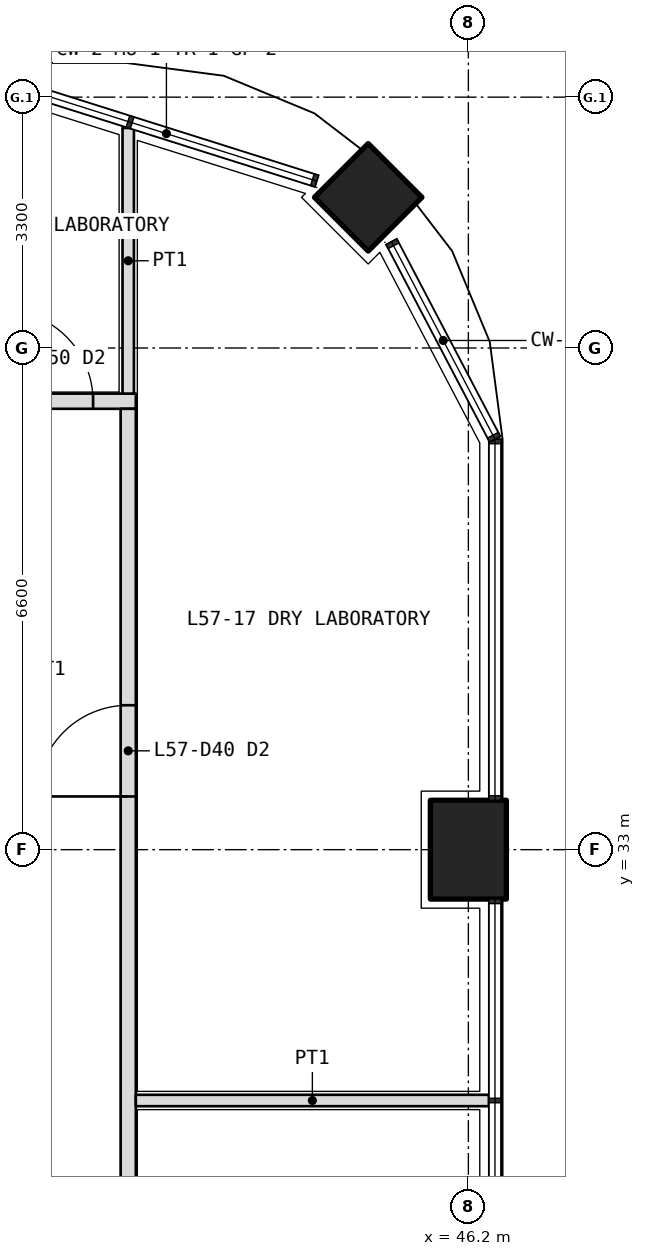
"""IFC4 building model, lengths in metres.
Left out: names, types, materials, properties, quantities, classifications, styles, units other than length and angle.
Written with IfcOpenShell. Run it as: python <this file> out.ifc"""

import sys

from ifc_helpers import new_model, si_unit, direction, frame, frame_2d, origin, origin_2d, place, context, subcontext, project, spatial, rectangle, extrude, element, fill, save


model = new_model("IFC4")
c1 = context("Model", 3, precision=1e-05, world=origin(), true_north=direction((0.0, 1.0)))
c2 = subcontext(c1, "Body", "Model", "MODEL_VIEW")
j1 = project(units=[si_unit("LENGTHUNIT", "METRE"), si_unit("PLANEANGLEUNIT", "RADIAN")], contexts=[c1])
p1 = place(None, origin())
s1 = spatial("IfcSite", under=j1, at=p1, CompositionType="ELEMENT")
p2 = place(p1, origin())
s2 = spatial("IfcBuilding", under=s1, at=p2, CompositionType="ELEMENT")
p3 = place(p2, frame((0.0, 0.0, 250.2)))
s3 = spatial("IfcBuildingStorey", under=s2, at=p3, CompositionType="ELEMENT", Elevation=250.2)
p4 = place(p3, frame((44.882, 41.582, 0.0), z_axis=(0.0, 0.0, 1.0), x_axis=(0.707106781187, 0.707106781187, 0.0)))
e1 = element("IfcColumn", 1, at=p4, inside=s3, PredefinedType="COLUMN", context=c2, shape_type="SweptSolid", body=[
    extrude(rectangle(XDim=1.0, YDim=1.0, at=origin_2d()), origin(), (0.0, 0.0, 1.0), 4.2),
])
p5 = place(p3, frame((46.2, 33.0, 0.0), z_axis=(0.0, 0.0, 1.0), x_axis=(0.0, 1.0, 0.0)))
e2 = element("IfcColumn", 2, at=p5, inside=s3, PredefinedType="COLUMN", context=c2, shape_type="SweptSolid", body=[
    extrude(rectangle(XDim=1.3, YDim=1.0, at=origin_2d()), origin(), (0.0, 0.0, 1.0), 4.2),
])
p6 = place(p3, frame((10.975, 38.9, 0.0), z_axis=(0.0, 0.0, 1.0), x_axis=(1.0, 0.0, 0.0)))
e3 = element("IfcWall", 3, at=p6, inside=s3, PredefinedType="PARTITIONING", context=c2, shape_type="SweptSolid", body=[
    extrude(rectangle(XDim=30.85, YDim=0.2, at=frame_2d((15.425, 0.0))), origin(), (0.0, 0.0, 1.0), 3.0),
])
p7 = place(p6, frame((2.312, 0.0, 0.0)))
e4 = element("IfcOpeningElement", 4, at=p7, cuts=e3, PredefinedType="OPENING", context=c2, shape_type="SweptSolid", body=[
    extrude(rectangle(XDim=1.0, YDim=2.1, at=frame_2d((0.5, 1.05))), frame((0.0, 0.11, 0.0), z_axis=(0.0, -1.0, 0.0), x_axis=(1.0, 0.0, 0.0)), (0.0, 0.0, 1.0), 0.22),
])
p8 = place(p6, frame((6.675, 0.0, 0.0)))
e5 = element("IfcOpeningElement", 5, at=p8, cuts=e3, PredefinedType="OPENING", context=c2, shape_type="SweptSolid", body=[
    extrude(rectangle(XDim=1.0, YDim=2.1, at=frame_2d((0.5, 1.05))), frame((0.0, 0.11, 0.0), z_axis=(0.0, -1.0, 0.0), x_axis=(1.0, 0.0, 0.0)), (0.0, 0.0, 1.0), 0.22),
])
p9 = place(p6, frame((14.925, 0.0, 0.0)))
e6 = element("IfcOpeningElement", 6, at=p9, cuts=e3, PredefinedType="OPENING", context=c2, shape_type="SweptSolid", body=[
    extrude(rectangle(XDim=1.0, YDim=2.1, at=frame_2d((0.5, 1.05))), frame((0.0, 0.11, 0.0), z_axis=(0.0, -1.0, 0.0), x_axis=(1.0, 0.0, 0.0)), (0.0, 0.0, 1.0), 0.22),
])
p10 = place(p6, frame((23.625, 0.0, 0.0)))
e7 = element("IfcOpeningElement", 7, at=p10, cuts=e3, PredefinedType="OPENING", context=c2, shape_type="SweptSolid", body=[
    extrude(rectangle(XDim=1.0, YDim=2.1, at=frame_2d((0.5, 1.05))), frame((0.0, 0.11, 0.0), z_axis=(0.0, -1.0, 0.0), x_axis=(1.0, 0.0, 0.0)), (0.0, 0.0, 1.0), 0.22),
])
p11 = place(p6, frame((26.925, 0.0, 0.0)))
e8 = element("IfcOpeningElement", 8, at=p11, cuts=e3, PredefinedType="OPENING", context=c2, shape_type="SweptSolid", body=[
    extrude(rectangle(XDim=1.0, YDim=2.1, at=frame_2d((0.5, 1.05))), frame((0.0, 0.11, 0.0), z_axis=(0.0, -1.0, 0.0), x_axis=(1.0, 0.0, 0.0)), (0.0, 0.0, 1.0), 0.22),
])
p12 = place(p6, frame((29.087, 0.0, 0.0)))
e9 = element("IfcOpeningElement", 9, at=p12, cuts=e3, PredefinedType="OPENING", context=c2, shape_type="SweptSolid", body=[
    extrude(rectangle(XDim=1.2, YDim=2.1, at=frame_2d((0.6, 1.05))), frame((0.0, 0.11, 0.0), z_axis=(0.0, -1.0, 0.0), x_axis=(1.0, 0.0, 0.0)), (0.0, 0.0, 1.0), 0.22),
])
p13 = place(p3, frame((41.725, 7.4, 0.0), z_axis=(0.0, 0.0, 1.0), x_axis=(0.0, 1.0, 0.0)))
e10 = element("IfcWall", 10, at=p13, inside=s3, PredefinedType="PARTITIONING", context=c2, shape_type="SweptSolid", body=[
    extrude(rectangle(XDim=31.4, YDim=0.2, at=frame_2d((15.7, 0.0))), origin(), (0.0, 0.0, 1.0), 3.0),
])
p14 = place(p13, frame((4.0, 0.0, 0.0)))
e11 = element("IfcOpeningElement", 11, at=p14, cuts=e10, PredefinedType="OPENING", context=c2, shape_type="SweptSolid", body=[
    extrude(rectangle(XDim=1.0, YDim=2.1, at=frame_2d((0.5, 1.05))), frame((0.0, 0.11, 0.0), z_axis=(0.0, -1.0, 0.0), x_axis=(1.0, 0.0, 0.0)), (0.0, 0.0, 1.0), 0.22),
])
p15 = place(p13, frame((10.25, 0.0, 0.0)))
e12 = element("IfcOpeningElement", 12, at=p15, cuts=e10, PredefinedType="OPENING", context=c2, shape_type="SweptSolid", body=[
    extrude(rectangle(XDim=1.0, YDim=2.1, at=frame_2d((0.5, 1.05))), frame((0.0, 0.11, 0.0), z_axis=(0.0, -1.0, 0.0), x_axis=(1.0, 0.0, 0.0)), (0.0, 0.0, 1.0), 0.22),
])
p16 = place(p13, frame((13.4, 0.0, 0.0)))
e13 = element("IfcOpeningElement", 13, at=p16, cuts=e10, PredefinedType="OPENING", context=c2, shape_type="SweptSolid", body=[
    extrude(rectangle(XDim=1.0, YDim=2.1, at=frame_2d((0.5, 1.05))), frame((0.0, 0.11, 0.0), z_axis=(0.0, -1.0, 0.0), x_axis=(1.0, 0.0, 0.0)), (0.0, 0.0, 1.0), 0.22),
])
p17 = place(p13, frame((16.75, 0.0, 0.0)))
e14 = element("IfcOpeningElement", 14, at=p17, cuts=e10, PredefinedType="OPENING", context=c2, shape_type="SweptSolid", body=[
    extrude(rectangle(XDim=0.9, YDim=2.1, at=frame_2d((0.45, 1.05))), frame((0.0, 0.11, 0.0), z_axis=(0.0, -1.0, 0.0), x_axis=(1.0, 0.0, 0.0)), (0.0, 0.0, 1.0), 0.22),
])
p18 = place(p13, frame((20.05, 0.0, 0.0)))
e15 = element("IfcOpeningElement", 15, at=p18, cuts=e10, PredefinedType="OPENING", context=c2, shape_type="SweptSolid", body=[
    extrude(rectangle(XDim=1.2, YDim=2.1, at=frame_2d((0.6, 1.05))), frame((0.0, 0.11, 0.0), z_axis=(0.0, -1.0, 0.0), x_axis=(1.0, 0.0, 0.0)), (0.0, 0.0, 1.0), 0.22),
])
p19 = place(p13, frame((26.3, 0.0, 0.0)))
e16 = element("IfcOpeningElement", 16, at=p19, cuts=e10, PredefinedType="OPENING", context=c2, shape_type="SweptSolid", body=[
    extrude(rectangle(XDim=1.2, YDim=2.1, at=frame_2d((0.6, 1.05))), frame((0.0, 0.11, 0.0), z_axis=(0.0, -1.0, 0.0), x_axis=(1.0, 0.0, 0.0)), (0.0, 0.0, 1.0), 0.22),
])
p20 = place(p3, frame((41.725, 42.495, 0.0), z_axis=(0.0, 0.0, 1.0), x_axis=(0.0, -1.0, 0.0)))
e17 = element("IfcWall", 17, at=p20, inside=s3, PredefinedType="PARTITIONING", context=c2, shape_type="SweptSolid", body=[
    extrude(rectangle(XDim=3.495, YDim=0.15, at=frame_2d((1.748, 0.0))), origin(), (0.0, 0.0, 1.0), 2.7),
])
p21 = place(p3, frame((46.47, 29.7, 0.0), z_axis=(0.0, 0.0, 1.0), x_axis=(-1.0, 0.0, 0.0)))
e18 = element("IfcWall", 18, at=p21, inside=s3, PredefinedType="PARTITIONING", context=c2, shape_type="SweptSolid", body=[
    extrude(rectangle(XDim=4.645, YDim=0.15, at=frame_2d((2.323, 0.0))), origin(), (0.0, 0.0, 1.0), 2.7),
])
p22 = place(p19, origin())
e19 = element("IfcDoor", 19, at=p22, inside=s3, OperationType="DOUBLE_DOOR_SINGLE_SWING", PredefinedType="DOOR", context=c2, shape_type="SweptSolid", body=[
    extrude(rectangle(XDim=1.2, YDim=2.1, at=frame_2d((0.6, 1.05))), frame((0.0, 0.025, 0.0), z_axis=(0.0, -1.0, 0.0), x_axis=(1.0, 0.0, 0.0)), (0.0, 0.0, 1.0), 0.05),
])
fill(e16, e19)
p23 = place(p12, origin())
e20 = element("IfcDoor", 20, at=p23, inside=s3, OperationType="DOUBLE_DOOR_SINGLE_SWING", PredefinedType="DOOR", context=c2, shape_type="SweptSolid", body=[
    extrude(rectangle(XDim=1.2, YDim=2.1, at=frame_2d((0.6, 1.05))), frame((0.0, 0.025, 0.0), z_axis=(0.0, -1.0, 0.0), x_axis=(1.0, 0.0, 0.0)), (0.0, 0.0, 1.0), 0.05),
])
fill(e9, e20)
save(model, sys.argv[1])
